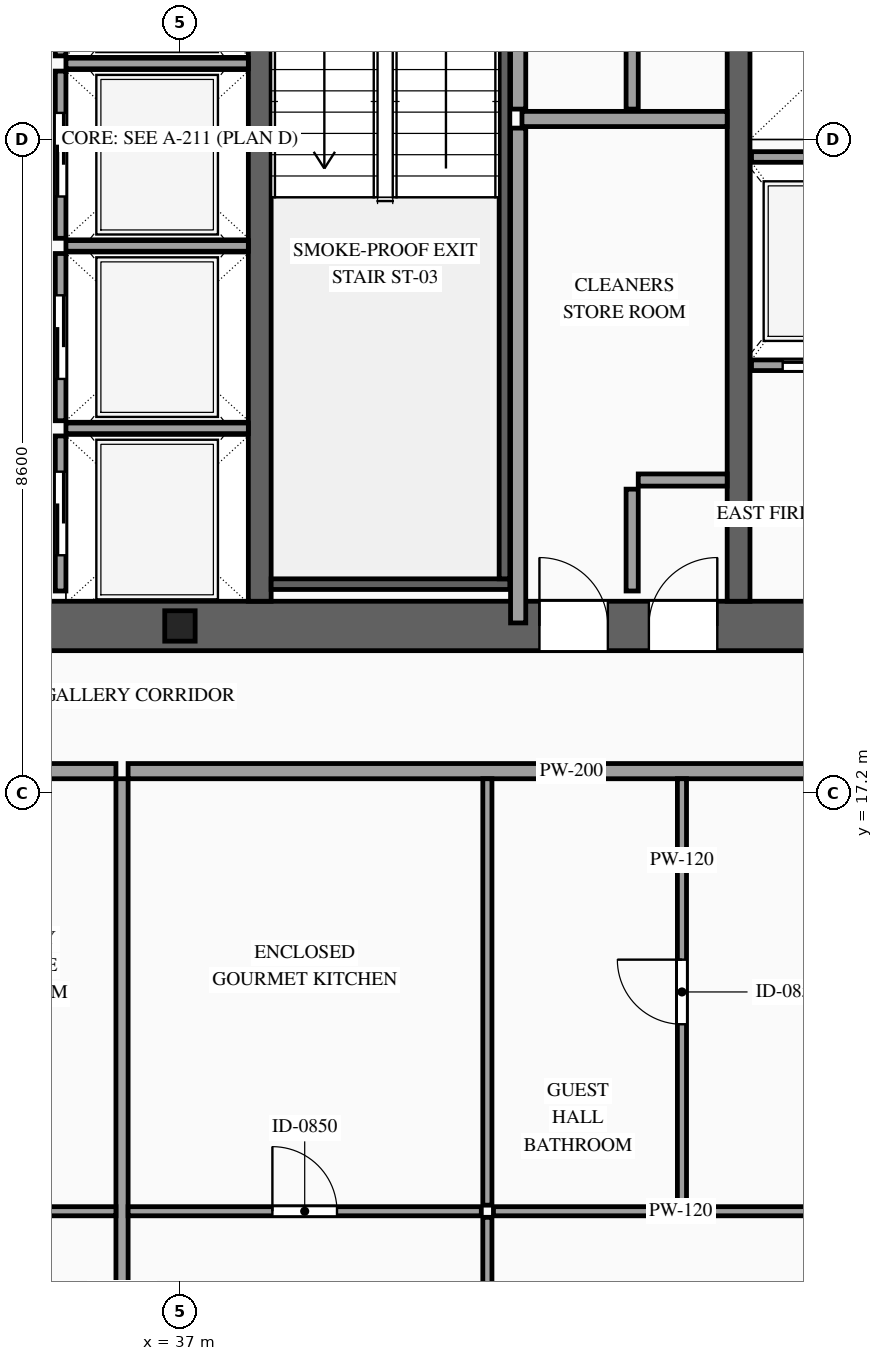
"""IFC4 building model, lengths in metres.
Left out: names, types, materials, properties, quantities, classifications, styles, units other than length and angle.
Written with IfcOpenShell. Run it as: python <this file> out.ifc"""

import sys

from ifc_helpers import new_model, si_unit, direction, frame, frame_2d, origin, origin_2d, place, context, subcontext, project, spatial, rectangle, i_section, extrude, source, transform, mapped, element, fill, save


model = new_model("IFC4")
c1 = context("Model", 3, precision=1e-05, world=origin(), true_north=direction((0.0, 1.0)))
c2 = subcontext(c1, "Body", "Model", "MODEL_VIEW")
j1 = project(units=[si_unit("LENGTHUNIT", "METRE"), si_unit("PLANEANGLEUNIT", "RADIAN")], contexts=[c1])
p1 = place(None, origin())
s1 = spatial("IfcSite", under=j1, at=p1, CompositionType="ELEMENT")
p2 = place(p1, origin())
s2 = spatial("IfcBuilding", under=s1, at=p2, CompositionType="ELEMENT")
p3 = place(p2, frame((0.0, 0.0, 198.5)))
s3 = spatial("IfcBuildingStorey", under=s2, at=p3, CompositionType="ELEMENT", Elevation=198.5)
p4 = place(p3, frame((23.475, 19.4, 0.0), z_axis=(0.0, 0.0, 1.0), x_axis=(1.0, 0.0, 0.0)))
e1 = element("IfcWall", 1, at=p4, inside=s3, PredefinedType="SHEAR", context=c2, shape_type="SweptSolid", body=[
    extrude(rectangle(XDim=27.05, YDim=0.65, at=frame_2d((13.525, 0.0))), origin(), (0.0, 0.0, 1.0), 3.5),
])
p5 = place(p4, frame((1.975, 0.0, 0.0)))
e2 = element("IfcOpeningElement", 2, at=p5, cuts=e1, PredefinedType="OPENING", context=c2, shape_type="SweptSolid", body=[
    extrude(rectangle(XDim=1.1, YDim=2.2, at=frame_2d((0.55, 1.1))), frame((0.0, 0.34, 0.0), z_axis=(0.0, -1.0, 0.0), x_axis=(1.0, 0.0, 0.0)), (0.0, 0.0, 1.0), 0.68),
])
p6 = place(p4, frame((9.875, 0.0, 0.0)))
e3 = element("IfcOpeningElement", 3, at=p6, cuts=e1, PredefinedType="OPENING", context=c2, shape_type="SweptSolid", body=[
    extrude(rectangle(XDim=1.1, YDim=2.2, at=frame_2d((0.55, 1.1))), frame((0.0, 0.34, 0.0), z_axis=(0.0, -1.0, 0.0), x_axis=(1.0, 0.0, 0.0)), (0.0, 0.0, 1.0), 0.68),
])
p7 = place(p4, frame((23.075, 0.0, 0.0)))
e4 = element("IfcOpeningElement", 4, at=p7, cuts=e1, PredefinedType="OPENING", context=c2, shape_type="SweptSolid", body=[
    extrude(rectangle(XDim=1.1, YDim=2.2, at=frame_2d((0.55, 1.1))), frame((0.0, 0.34, 0.0), z_axis=(0.0, -1.0, 0.0), x_axis=(1.0, 0.0, 0.0)), (0.0, 0.0, 1.0), 0.68),
])
p8 = place(p4, frame((19.695, 0.0, 0.0)))
e5 = element("IfcOpeningElement", 5, at=p8, cuts=e1, PredefinedType="OPENING", context=c2, shape_type="SweptSolid", body=[
    extrude(rectangle(XDim=0.9, YDim=2.15, at=frame_2d((0.45, 1.075))), frame((0.0, 0.34, 0.0), z_axis=(0.0, -1.0, 0.0), x_axis=(1.0, 0.0, 0.0)), (0.0, 0.0, 1.0), 0.68),
])
p9 = place(p4, frame((18.255, 0.0, 0.0)))
e6 = element("IfcOpeningElement", 6, at=p9, cuts=e1, PredefinedType="OPENING", context=c2, shape_type="SweptSolid", body=[
    extrude(rectangle(XDim=0.9, YDim=2.15, at=frame_2d((0.45, 1.075))), frame((0.0, 0.34, 0.0), z_axis=(0.0, -1.0, 0.0), x_axis=(1.0, 0.0, 0.0)), (0.0, 0.0, 1.0), 0.68),
])
m1 = source(origin(), c2, "Body", "SweptSolid", [
    extrude(rectangle(XDim=12.15, YDim=0.3, at=frame_2d((6.075, 0.0))), origin(), (0.0, 0.0, 1.0), 3.5),
])
for number, where, z_axis, x_axis in (
    (7, (38.05, 19.725, 0.0), (0.0, 0.0, 1.0), (0.0, 1.0, 0.0)),
    (8, (44.35, 19.725, 0.0), (0.0, 0.0, 1.0), (0.0, 1.0, 0.0)),
):
    element("IfcWall", number, at=place(p3, frame(where, z_axis=z_axis, x_axis=x_axis)), inside=s3, PredefinedType="SOLIDWALL", context=c2, shape_type="MappedRepresentation", body=[
        mapped(m1, transform((0.0, 0.0, 0.0), scale=1.0)),
    ])
m2 = source(origin(), c2, "Body", "SweptSolid", [
    extrude(i_section(OverallWidth=0.4, OverallDepth=0.4, WebThickness=0.013, FlangeThickness=0.021, at=origin_2d()), origin(), (0.0, 0.0, 1.0), 3.5),
])
p10 = place(p3, frame((37.0, 19.4, 0.0), z_axis=(0.0, 0.0, 1.0), x_axis=(1.0, 0.0, 0.0)))
e9 = element("IfcColumn", 9, at=p10, inside=s3, PredefinedType="COLUMN", context=c2, shape_type="MappedRepresentation", body=[
    mapped(m2, transform((0.0, 0.0, 0.0), scale=1.0)),
])
p11 = place(p3, frame((44.52, 22.83, 0.0), z_axis=(0.0, 0.0, 1.0), x_axis=(1.0, 0.0, 0.0)))
e10 = element("IfcWall", 10, at=p11, inside=s3, PredefinedType="SOLIDWALL", context=c2, shape_type="SweptSolid", body=[
    extrude(rectangle(XDim=1.92, YDim=0.14, at=frame_2d((0.96, 0.0))), origin(), (0.0, 0.0, 1.0), 3.28),
])
p12 = place(p11, frame((0.41, 0.0, 0.0)))
e11 = element("IfcOpeningElement", 11, at=p12, cuts=e10, PredefinedType="OPENING", context=c2, shape_type="SweptSolid", body=[
    extrude(rectangle(XDim=1.1, YDim=2.2, at=frame_2d((0.55, 1.1))), frame((0.0, 0.085, 0.0), z_axis=(0.0, -1.0, 0.0), x_axis=(1.0, 0.0, 0.0)), (0.0, 0.0, 1.0), 0.17),
])
m3 = source(origin(), c2, "Body", "SweptSolid", [
    extrude(rectangle(XDim=1.92, YDim=0.14, at=frame_2d((0.96, 0.0))), origin(), (0.0, 0.0, 1.0), 3.28),
])
p13 = place(p3, frame((44.52, 25.57, 0.0), z_axis=(0.0, 0.0, 1.0), x_axis=(1.0, 0.0, 0.0)))
e12 = element("IfcWall", 12, at=p13, inside=s3, PredefinedType="SOLIDWALL", context=c2, shape_type="MappedRepresentation", body=[
    mapped(m3, transform((0.0, 0.0, 0.0), scale=1.0)),
])
p14 = place(p3, frame((35.43, 19.86, 0.0), z_axis=(0.0, 0.0, 1.0), x_axis=(0.0, 1.0, 0.0)))
e13 = element("IfcWall", 13, at=p14, inside=s3, PredefinedType="SOLIDWALL", context=c2, shape_type="SweptSolid", body=[
    extrude(rectangle(XDim=2.04, YDim=0.14, at=frame_2d((1.02, 0.0))), origin(), (0.0, 0.0, 1.0), 3.28),
])
p15 = place(p14, frame((0.47, 0.0, 0.0)))
e14 = element("IfcOpeningElement", 14, at=p15, cuts=e13, PredefinedType="OPENING", context=c2, shape_type="SweptSolid", body=[
    extrude(rectangle(XDim=1.1, YDim=2.2, at=frame_2d((0.55, 1.1))), frame((0.0, 0.085, 0.0), z_axis=(0.0, -1.0, 0.0), x_axis=(1.0, 0.0, 0.0)), (0.0, 0.0, 1.0), 0.17),
])
m4 = source(origin(), c2, "Body", "SweptSolid", [
    extrude(rectangle(XDim=2.4, YDim=0.14, at=frame_2d((1.2, 0.0))), origin(), (0.0, 0.0, 1.0), 3.28),
])
p16 = place(p3, frame((35.5, 22.0, 0.0), z_axis=(0.0, 0.0, 1.0), x_axis=(1.0, 0.0, 0.0)))
e15 = element("IfcWall", 15, at=p16, inside=s3, PredefinedType="SOLIDWALL", context=c2, shape_type="MappedRepresentation", body=[
    mapped(m4, transform((0.0, 0.0, 0.0), scale=1.0)),
])
p17 = place(p3, frame((35.43, 22.1, 0.0), z_axis=(0.0, 0.0, 1.0), x_axis=(0.0, 1.0, 0.0)))
e16 = element("IfcWall", 16, at=p17, inside=s3, PredefinedType="SOLIDWALL", context=c2, shape_type="SweptSolid", body=[
    extrude(rectangle(XDim=2.2, YDim=0.14, at=frame_2d((1.1, 0.0))), origin(), (0.0, 0.0, 1.0), 3.28),
])
p18 = place(p17, frame((0.55, 0.0, 0.0)))
e17 = element("IfcOpeningElement", 17, at=p18, cuts=e16, PredefinedType="OPENING", context=c2, shape_type="SweptSolid", body=[
    extrude(rectangle(XDim=1.1, YDim=2.2, at=frame_2d((0.55, 1.1))), frame((0.0, 0.085, 0.0), z_axis=(0.0, -1.0, 0.0), x_axis=(1.0, 0.0, 0.0)), (0.0, 0.0, 1.0), 0.17),
])
p19 = place(p3, frame((35.5, 24.4, 0.0), z_axis=(0.0, 0.0, 1.0), x_axis=(1.0, 0.0, 0.0)))
e18 = element("IfcWall", 18, at=p19, inside=s3, PredefinedType="SOLIDWALL", context=c2, shape_type="MappedRepresentation", body=[
    mapped(m4, transform((0.0, 0.0, 0.0), scale=1.0)),
])
p20 = place(p3, frame((35.43, 24.5, 0.0), z_axis=(0.0, 0.0, 1.0), x_axis=(0.0, 1.0, 0.0)))
e19 = element("IfcWall", 19, at=p20, inside=s3, PredefinedType="SOLIDWALL", context=c2, shape_type="SweptSolid", body=[
    extrude(rectangle(XDim=2.2, YDim=0.14, at=frame_2d((1.1, 0.0))), origin(), (0.0, 0.0, 1.0), 3.28),
])
p21 = place(p20, frame((0.55, 0.0, 0.0)))
e20 = element("IfcOpeningElement", 20, at=p21, cuts=e19, PredefinedType="OPENING", context=c2, shape_type="SweptSolid", body=[
    extrude(rectangle(XDim=1.1, YDim=2.2, at=frame_2d((0.55, 1.1))), frame((0.0, 0.085, 0.0), z_axis=(0.0, -1.0, 0.0), x_axis=(1.0, 0.0, 0.0)), (0.0, 0.0, 1.0), 0.17),
])
p22 = place(p3, frame((35.5, 26.8, 0.0), z_axis=(0.0, 0.0, 1.0), x_axis=(1.0, 0.0, 0.0)))
e21 = element("IfcWall", 21, at=p22, inside=s3, PredefinedType="SOLIDWALL", context=c2, shape_type="MappedRepresentation", body=[
    mapped(m4, transform((0.0, 0.0, 0.0), scale=1.0)),
])
p23 = place(p3, frame((35.43, 26.9, 0.0), z_axis=(0.0, 0.0, 1.0), x_axis=(0.0, 1.0, 0.0)))
e22 = element("IfcWall", 22, at=p23, inside=s3, PredefinedType="SOLIDWALL", context=c2, shape_type="SweptSolid", body=[
    extrude(rectangle(XDim=2.2, YDim=0.14, at=frame_2d((1.1, 0.0))), origin(), (0.0, 0.0, 1.0), 3.28),
])
p24 = place(p23, frame((0.55, 0.0, 0.0)))
e23 = element("IfcOpeningElement", 23, at=p24, cuts=e22, PredefinedType="OPENING", context=c2, shape_type="SweptSolid", body=[
    extrude(rectangle(XDim=1.1, YDim=2.2, at=frame_2d((0.55, 1.1))), frame((0.0, 0.085, 0.0), z_axis=(0.0, -1.0, 0.0), x_axis=(1.0, 0.0, 0.0)), (0.0, 0.0, 1.0), 0.17),
])
m5 = source(origin(), c2, "Body", "SweptSolid", [
    extrude(rectangle(XDim=3.14, YDim=0.14, at=frame_2d((1.57, 0.0))), origin(), (0.0, 0.0, 1.0), 3.28),
])
p25 = place(p3, frame((38.2, 19.95, 0.0), z_axis=(0.0, 0.0, 1.0), x_axis=(1.0, 0.0, 0.0)))
e24 = element("IfcWall", 24, at=p25, inside=s3, PredefinedType="SOLIDWALL", context=c2, shape_type="MappedRepresentation", body=[
    mapped(m5, transform((0.0, 0.0, 0.0), scale=1.0)),
])
m6 = source(origin(), c2, "Body", "SweptSolid", [
    extrude(rectangle(XDim=8.94, YDim=0.14, at=frame_2d((4.47, 0.0))), origin(), (0.0, 0.0, 1.0), 3.28),
])
p26 = place(p3, frame((41.27, 20.02, 0.0), z_axis=(0.0, 0.0, 1.0), x_axis=(0.0, 1.0, 0.0)))
e25 = element("IfcWall", 25, at=p26, inside=s3, PredefinedType="SOLIDWALL", context=c2, shape_type="MappedRepresentation", body=[
    mapped(m6, transform((0.0, 0.0, 0.0), scale=1.0)),
])
m7 = source(origin(), c2, "Body", "SweptSolid", [
    extrude(rectangle(XDim=1.34, YDim=0.16, at=frame_2d((0.67, 0.0))), origin(), (0.0, 0.0, 1.0), 3.28),
])
p27 = place(p3, frame((42.95, 19.86, 0.0), z_axis=(0.0, 0.0, 1.0), x_axis=(0.0, 1.0, 0.0)))
e26 = element("IfcWall", 26, at=p27, inside=s3, PredefinedType="PARTITIONING", context=c2, shape_type="MappedRepresentation", body=[
    mapped(m7, transform((0.0, 0.0, 0.0), scale=1.0)),
])
m8 = source(origin(), c2, "Body", "SweptSolid", [
    extrude(rectangle(XDim=1.17, YDim=0.16, at=frame_2d((0.585, 0.0))), origin(), (0.0, 0.0, 1.0), 3.28),
])
p28 = place(p3, frame((43.03, 21.32, 0.0), z_axis=(0.0, 0.0, 1.0), x_axis=(1.0, 0.0, 0.0)))
e27 = element("IfcWall", 27, at=p28, inside=s3, PredefinedType="PARTITIONING", context=c2, shape_type="MappedRepresentation", body=[
    mapped(m8, transform((0.0, 0.0, 0.0), scale=1.0)),
])
m9 = source(origin(), c2, "Body", "SweptSolid", [
    extrude(rectangle(XDim=6.51, YDim=0.2, at=frame_2d((3.255, 0.0))), origin(), (0.0, 0.0, 1.0), 3.28),
])
p29 = place(p3, frame((41.45, 19.44, 0.0), z_axis=(0.0, 0.0, 1.0), x_axis=(0.0, 1.0, 0.0)))
e28 = element("IfcWall", 28, at=p29, inside=s3, PredefinedType="PARTITIONING", context=c2, shape_type="MappedRepresentation", body=[
    mapped(m9, transform((0.0, 0.0, 0.0), scale=1.0)),
])
m10 = source(origin(), c2, "Body", "SweptSolid", [
    extrude(rectangle(XDim=2.7, YDim=0.2, at=frame_2d((1.35, 0.0))), origin(), (0.0, 0.0, 1.0), 3.28),
])
p30 = place(p3, frame((41.5, 26.07, 0.0), z_axis=(0.0, 0.0, 1.0), x_axis=(1.0, 0.0, 0.0)))
e29 = element("IfcWall", 29, at=p30, inside=s3, PredefinedType="PARTITIONING", context=c2, shape_type="MappedRepresentation", body=[
    mapped(m10, transform((0.0, 0.0, 0.0), scale=1.0)),
])
m11 = source(origin(), c2, "Body", "SweptSolid", [
    extrude(rectangle(XDim=5.96, YDim=0.2, at=frame_2d((2.98, 0.0))), origin(), (0.0, 0.0, 1.0), 3.28),
])
p31 = place(p3, frame((41.45, 26.2, 0.0), z_axis=(0.0, 0.0, 1.0), x_axis=(0.0, 1.0, 0.0)))
e30 = element("IfcWall", 30, at=p31, inside=s3, PredefinedType="PARTITIONING", context=c2, shape_type="MappedRepresentation", body=[
    mapped(m11, transform((0.0, 0.0, 0.0), scale=1.0)),
])
m12 = source(origin(), c2, "Body", "SweptSolid", [
    extrude(rectangle(XDim=5.96, YDim=0.16, at=frame_2d((2.98, 0.0))), origin(), (0.0, 0.0, 1.0), 3.28),
])
p32 = place(p3, frame((42.95, 26.2, 0.0), z_axis=(0.0, 0.0, 1.0), x_axis=(0.0, 1.0, 0.0)))
e31 = element("IfcWall", 31, at=p32, inside=s3, PredefinedType="PARTITIONING", context=c2, shape_type="MappedRepresentation", body=[
    mapped(m12, transform((0.0, 0.0, 0.0), scale=1.0)),
])
p33 = place(p3, frame((17.94, 17.49, 0.0), z_axis=(0.0, 0.0, 1.0), x_axis=(1.0, 0.0, 0.0)))
e32 = element("IfcWall", 32, at=p33, inside=s3, PredefinedType="PARTITIONING", context=c2, shape_type="SweptSolid", body=[
    extrude(rectangle(XDim=18.218, YDim=0.2, at=frame_2d((9.109, 0.0))), origin(), (0.0, 0.0, 1.0), 3.28),
])
p34 = place(p33, frame((10.556, 0.0, 0.0)))
e33 = element("IfcOpeningElement", 33, at=p34, cuts=e32, PredefinedType="OPENING", context=c2, shape_type="SweptSolid", body=[
    extrude(rectangle(XDim=1.0, YDim=2.2, at=frame_2d((0.5, 1.1))), frame((0.0, 0.115, 0.0), z_axis=(0.0, -1.0, 0.0), x_axis=(1.0, 0.0, 0.0)), (0.0, 0.0, 1.0), 0.23),
])
m13 = source(origin(), c2, "Body", "SweptSolid", [
    extrude(rectangle(XDim=13.54, YDim=0.16, at=frame_2d((6.77, 0.0))), origin(), (0.0, 0.0, 1.0), 3.28),
])
p35 = place(p3, frame((36.238, 3.85, 0.0), z_axis=(0.0, 0.0, 1.0), x_axis=(0.0, 1.0, 0.0)))
e34 = element("IfcWall", 34, at=p35, inside=s3, PredefinedType="PARTITIONING", context=c2, shape_type="MappedRepresentation", body=[
    mapped(m13, transform((0.0, 0.0, 0.0), scale=1.0)),
])
p36 = place(p3, frame((31.511, 11.7, 0.0), z_axis=(0.0, 0.0, 1.0), x_axis=(1.0, 0.0, 0.0)))
e35 = element("IfcWall", 35, at=p36, inside=s3, PredefinedType="PARTITIONING", context=c2, shape_type="SweptSolid", body=[
    extrude(rectangle(XDim=4.647, YDim=0.12, at=frame_2d((2.323, 0.0))), origin(), (0.0, 0.0, 1.0), 2.875),
])
p37 = place(p36, frame((2.872, 0.0, 0.0)))
e36 = element("IfcOpeningElement", 36, at=p37, cuts=e35, PredefinedType="OPENING", context=c2, shape_type="SweptSolid", body=[
    extrude(rectangle(XDim=0.85, YDim=2.1, at=frame_2d((0.425, 1.05))), frame((0.0, 0.075, 0.0), z_axis=(0.0, -1.0, 0.0), x_axis=(1.0, 0.0, 0.0)), (0.0, 0.0, 1.0), 0.15),
])
p38 = place(p36, frame((0.469, 0.0, 0.0)))
e37 = element("IfcOpeningElement", 37, at=p38, cuts=e35, PredefinedType="OPENING", context=c2, shape_type="SweptSolid", body=[
    extrude(rectangle(XDim=0.85, YDim=2.1, at=frame_2d((0.425, 1.05))), frame((0.0, 0.075, 0.0), z_axis=(0.0, -1.0, 0.0), x_axis=(1.0, 0.0, 0.0)), (0.0, 0.0, 1.0), 0.15),
])
p39 = place(p3, frame((36.318, 17.49, 0.0), z_axis=(0.0, 0.0, 1.0), x_axis=(1.0, 0.0, 0.0)))
e38 = element("IfcWall", 38, at=p39, inside=s3, PredefinedType="PARTITIONING", context=c2, shape_type="SweptSolid", body=[
    extrude(rectangle(XDim=19.742, YDim=0.2, at=frame_2d((9.871, 0.0))), origin(), (0.0, 0.0, 1.0), 3.28),
])
p40 = place(p39, frame((11.915, 0.0, 0.0)))
e39 = element("IfcOpeningElement", 39, at=p40, cuts=e38, PredefinedType="OPENING", context=c2, shape_type="SweptSolid", body=[
    extrude(rectangle(XDim=1.0, YDim=2.2, at=frame_2d((0.5, 1.1))), frame((0.0, 0.115, 0.0), z_axis=(0.0, -1.0, 0.0), x_axis=(1.0, 0.0, 0.0)), (0.0, 0.0, 1.0), 0.23),
])
p41 = place(p3, frame((36.318, 11.7, 0.0), z_axis=(0.0, 0.0, 1.0), x_axis=(1.0, 0.0, 0.0)))
e40 = element("IfcWall", 40, at=p41, inside=s3, PredefinedType="PARTITIONING", context=c2, shape_type="SweptSolid", body=[
    extrude(rectangle(XDim=4.647, YDim=0.12, at=frame_2d((2.323, 0.0))), origin(), (0.0, 0.0, 1.0), 2.875),
])
p42 = place(p41, frame((1.898, 0.0, 0.0)))
e41 = element("IfcOpeningElement", 41, at=p42, cuts=e40, PredefinedType="OPENING", context=c2, shape_type="SweptSolid", body=[
    extrude(rectangle(XDim=0.85, YDim=2.1, at=frame_2d((0.425, 1.05))), frame((0.0, 0.075, 0.0), z_axis=(0.0, -1.0, 0.0), x_axis=(1.0, 0.0, 0.0)), (0.0, 0.0, 1.0), 0.15),
])
m14 = source(origin(), c2, "Body", "SweptSolid", [
    extrude(rectangle(XDim=5.61, YDim=0.12, at=frame_2d((2.805, 0.0))), origin(), (0.0, 0.0, 1.0), 3.28),
])
p43 = place(p3, frame((41.045, 11.78, 0.0), z_axis=(0.0, 0.0, 1.0), x_axis=(0.0, 1.0, 0.0)))
e42 = element("IfcWall", 42, at=p43, inside=s3, PredefinedType="PARTITIONING", context=c2, shape_type="MappedRepresentation", body=[
    mapped(m14, transform((0.0, 0.0, 0.0), scale=1.0)),
])
p44 = place(p3, frame((43.605, 11.78, 0.0), z_axis=(0.0, 0.0, 1.0), x_axis=(0.0, 1.0, 0.0)))
e43 = element("IfcWall", 43, at=p44, inside=s3, PredefinedType="PARTITIONING", context=c2, shape_type="SweptSolid", body=[
    extrude(rectangle(XDim=5.61, YDim=0.12, at=frame_2d((2.805, 0.0))), origin(), (0.0, 0.0, 1.0), 3.28),
])
p45 = place(p44, frame((2.38, 0.0, 0.0)))
e44 = element("IfcOpeningElement", 44, at=p45, cuts=e43, PredefinedType="OPENING", context=c2, shape_type="SweptSolid", body=[
    extrude(rectangle(XDim=0.85, YDim=2.1, at=frame_2d((0.425, 1.05))), frame((0.0, 0.075, 0.0), z_axis=(0.0, -1.0, 0.0), x_axis=(1.0, 0.0, 0.0)), (0.0, 0.0, 1.0), 0.15),
])
p46 = place(p3, frame((41.045, 3.85, 0.0), z_axis=(0.0, 0.0, 1.0), x_axis=(0.0, 1.0, 0.0)))
e45 = element("IfcWall", 45, at=p46, inside=s3, PredefinedType="PARTITIONING", context=c2, shape_type="SweptSolid", body=[
    extrude(rectangle(XDim=7.77, YDim=0.12, at=frame_2d((3.885, 0.0))), origin(), (0.0, 0.0, 1.0), 3.28),
])
p47 = place(p46, frame((3.435, 0.0, 0.0)))
e46 = element("IfcOpeningElement", 46, at=p47, cuts=e45, PredefinedType="OPENING", context=c2, shape_type="SweptSolid", body=[
    extrude(rectangle(XDim=0.9, YDim=2.15, at=frame_2d((0.45, 1.075))), frame((0.0, 0.075, 0.0), z_axis=(0.0, -1.0, 0.0), x_axis=(1.0, 0.0, 0.0)), (0.0, 0.0, 1.0), 0.15),
])
m15 = source(origin(), c2, "Body", "SweptSolid", [
    extrude(rectangle(XDim=4.928, YDim=0.12, at=frame_2d((2.464, 0.0))), origin(), (0.0, 0.0, 1.0), 2.875),
])
p48 = place(p3, frame((41.125, 11.7, 0.0), z_axis=(0.0, 0.0, 1.0), x_axis=(1.0, 0.0, 0.0)))
e47 = element("IfcWall", 47, at=p48, inside=s3, PredefinedType="PARTITIONING", context=c2, shape_type="MappedRepresentation", body=[
    mapped(m15, transform((0.0, 0.0, 0.0), scale=1.0)),
])
m16 = source(origin(), c2, "Body", "SweptSolid", [
    extrude(rectangle(XDim=1.1, YDim=2.2, at=frame_2d((0.55, 1.1))), frame((0.0, 0.025, 0.0), z_axis=(0.0, -1.0, 0.0), x_axis=(1.0, 0.0, 0.0)), (0.0, 0.0, 1.0), 0.05),
])
p49 = place(p12, origin())
e48 = element("IfcDoor", 48, at=p49, inside=s3, OperationType="SLIDING_TO_RIGHT", PredefinedType="DOOR", context=c2, shape_type="MappedRepresentation", body=[
    mapped(m16, transform((0.0, 0.0, 0.0), scale=1.0)),
])
fill(e11, e48)
p50 = place(p15, origin())
e49 = element("IfcDoor", 49, at=p50, inside=s3, OperationType="SLIDING_TO_RIGHT", PredefinedType="DOOR", context=c2, shape_type="MappedRepresentation", body=[
    mapped(m16, transform((0.0, 0.0, 0.0), scale=1.0)),
])
fill(e14, e49)
p51 = place(p18, origin())
e50 = element("IfcDoor", 50, at=p51, inside=s3, OperationType="SLIDING_TO_LEFT", PredefinedType="DOOR", context=c2, shape_type="MappedRepresentation", body=[
    mapped(m16, transform((0.0, 0.0, 0.0), scale=1.0)),
])
fill(e17, e50)
p52 = place(p21, origin())
e51 = element("IfcDoor", 51, at=p52, inside=s3, OperationType="SLIDING_TO_RIGHT", PredefinedType="DOOR", context=c2, shape_type="MappedRepresentation", body=[
    mapped(m16, transform((0.0, 0.0, 0.0), scale=1.0)),
])
fill(e20, e51)
m17 = source(origin(), c2, "Body", "SweptSolid", [
    extrude(rectangle(XDim=0.9, YDim=2.15, at=frame_2d((0.45, 1.075))), frame((0.0, 0.025, 0.0), z_axis=(0.0, -1.0, 0.0), x_axis=(1.0, 0.0, 0.0)), (0.0, 0.0, 1.0), 0.05),
])
p53 = place(p8, origin())
e52 = element("IfcDoor", 52, at=p53, inside=s3, OperationType="SINGLE_SWING_RIGHT", PredefinedType="DOOR", context=c2, shape_type="MappedRepresentation", body=[
    mapped(m17, transform((0.0, 0.0, 0.0), scale=1.0)),
])
fill(e5, e52)
p54 = place(p9, origin())
e53 = element("IfcDoor", 53, at=p54, inside=s3, OperationType="SINGLE_SWING_LEFT", PredefinedType="DOOR", context=c2, shape_type="MappedRepresentation", body=[
    mapped(m17, transform((0.0, 0.0, 0.0), scale=1.0)),
])
fill(e6, e53)
m18 = source(origin(), c2, "Body", "SweptSolid", [
    extrude(rectangle(XDim=0.85, YDim=2.1, at=frame_2d((0.425, 1.05))), frame((0.0, 0.025, 0.0), z_axis=(0.0, -1.0, 0.0), x_axis=(1.0, 0.0, 0.0)), (0.0, 0.0, 1.0), 0.05),
])
p55 = place(p42, origin())
e54 = element("IfcDoor", 54, at=p55, inside=s3, OperationType="SINGLE_SWING_LEFT", PredefinedType="DOOR", context=c2, shape_type="MappedRepresentation", body=[
    mapped(m18, transform((0.0, 0.0, 0.0), scale=1.0)),
])
fill(e41, e54)
p56 = place(p45, origin())
e55 = element("IfcDoor", 55, at=p56, inside=s3, OperationType="SINGLE_SWING_RIGHT", PredefinedType="DOOR", context=c2, shape_type="MappedRepresentation", body=[
    mapped(m18, transform((0.0, 0.0, 0.0), scale=1.0)),
])
fill(e44, e55)
save(model, sys.argv[1])
